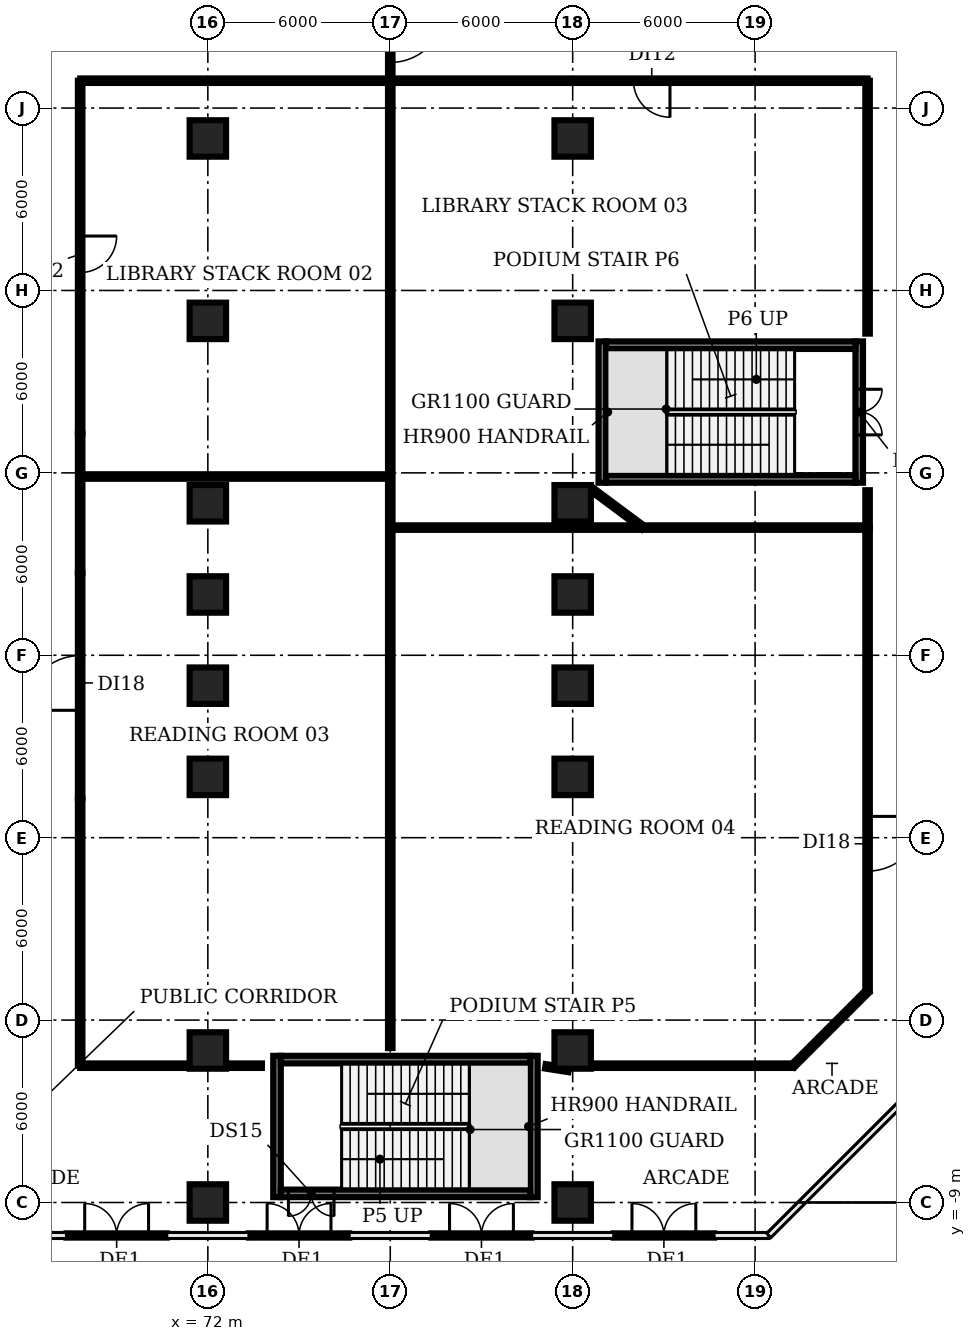
"""IFC4 building model, lengths in metres.
Left out: names, types, materials, properties, quantities, classifications, styles, units other than length and angle.
Written with IfcOpenShell. Run it as: python <this file> out.ifc"""

import sys

from ifc_helpers import new_model, si_unit, direction, frame, frame_2d, origin, origin_2d, place, context, subcontext, project, spatial, rectangle, extrude, element, fill, save


model = new_model("IFC4")
c1 = context("Model", 3, precision=1e-05, world=origin(), true_north=direction((0.0, 1.0)))
c2 = subcontext(c1, "Body", "Model", "MODEL_VIEW")
j1 = project(units=[si_unit("LENGTHUNIT", "METRE"), si_unit("PLANEANGLEUNIT", "RADIAN")], contexts=[c1])
p1 = place(None, origin())
s1 = spatial("IfcSite", under=j1, at=p1, CompositionType="ELEMENT")
p2 = place(p1, origin())
s2 = spatial("IfcBuilding", under=s1, at=p2, CompositionType="ELEMENT")
p3 = place(p2, origin())
s3 = spatial("IfcBuildingStorey", under=s2, at=p3, CompositionType="ELEMENT", Elevation=0.0)
for number, where, z_axis, x_axis in (
    (1, (72.0, -9.0, 0.0), (0.0, 0.0, 1.0), (1.0, 0.0, 0.0)),
    (2, (72.0, -4.0, 0.0), (0.0, 0.0, 1.0), (1.0, 0.0, 0.0)),
    (3, (72.0, 5.0, 0.0), (0.0, 0.0, 1.0), (1.0, 0.0, 0.0)),
    (4, (72.0, 8.0, 0.0), (0.0, 0.0, 1.0), (1.0, 0.0, 0.0)),
    (5, (72.0, 11.0, 0.0), (0.0, 0.0, 1.0), (1.0, 0.0, 0.0)),
    (6, (72.0, 14.0, 0.0), (0.0, 0.0, 1.0), (1.0, 0.0, 0.0)),
    (7, (72.0, 20.0, 0.0), (0.0, 0.0, 1.0), (1.0, 0.0, 0.0)),
    (8, (72.0, 26.0, 0.0), (0.0, 0.0, 1.0), (1.0, 0.0, 0.0)),
    (9, (84.0, -9.0, 0.0), (0.0, 0.0, 1.0), (1.0, 0.0, 0.0)),
    (10, (84.0, -4.0, 0.0), (0.0, 0.0, 1.0), (1.0, 0.0, 0.0)),
    (11, (84.0, 5.0, 0.0), (0.0, 0.0, 1.0), (1.0, 0.0, 0.0)),
    (12, (84.0, 8.0, 0.0), (0.0, 0.0, 1.0), (1.0, 0.0, 0.0)),
    (13, (84.0, 11.0, 0.0), (0.0, 0.0, 1.0), (1.0, 0.0, 0.0)),
    (14, (84.0, 14.0, 0.0), (0.0, 0.0, 1.0), (1.0, 0.0, 0.0)),
    (15, (84.0, 20.0, 0.0), (0.0, 0.0, 1.0), (1.0, 0.0, 0.0)),
    (16, (84.0, 26.0, 0.0), (0.0, 0.0, 1.0), (1.0, 0.0, 0.0)),
):
    element("IfcColumn", number, at=place(p3, frame(where, z_axis=z_axis, x_axis=x_axis)), inside=s3, PredefinedType="COLUMN", context=c2, shape_type="SweptSolid", body=[
        extrude(rectangle(XDim=1.2, YDim=1.2, at=origin_2d()), origin(), (0.0, 0.0, 1.0), 5.65),
    ])
p4 = place(p3, frame((67.35, -10.085, 0.0), z_axis=(0.0, 0.0, 1.0), x_axis=(1.0, 0.0, 0.0)))
e17 = element("IfcWall", 17, at=p4, inside=s3, PredefinedType="SOLIDWALL", context=c2, shape_type="SweptSolid", body=[
    extrude(rectangle(XDim=3.3, YDim=0.14, at=frame_2d((1.65, 0.0))), origin(), (0.0, 0.0, 1.0), 5.65),
])
p5 = place(p4, frame((0.6, 0.0, 0.0)))
e18 = element("IfcOpeningElement", 18, at=p5, cuts=e17, PredefinedType="OPENING", context=c2, shape_type="SweptSolid", body=[
    extrude(rectangle(XDim=2.1, YDim=2.4, at=frame_2d((1.05, 1.2))), frame((0.0, 0.08, 0.0), z_axis=(0.0, -1.0, 0.0), x_axis=(1.0, 0.0, 0.0)), (0.0, 0.0, 1.0), 0.16),
])
p6 = place(p3, frame((73.35, -10.085, 0.0), z_axis=(0.0, 0.0, 1.0), x_axis=(1.0, 0.0, 0.0)))
e19 = element("IfcWall", 19, at=p6, inside=s3, PredefinedType="SOLIDWALL", context=c2, shape_type="SweptSolid", body=[
    extrude(rectangle(XDim=3.3, YDim=0.14, at=frame_2d((1.65, 0.0))), origin(), (0.0, 0.0, 1.0), 5.65),
])
p7 = place(p6, frame((0.6, 0.0, 0.0)))
e20 = element("IfcOpeningElement", 20, at=p7, cuts=e19, PredefinedType="OPENING", context=c2, shape_type="SweptSolid", body=[
    extrude(rectangle(XDim=2.1, YDim=2.4, at=frame_2d((1.05, 1.2))), frame((0.0, 0.08, 0.0), z_axis=(0.0, -1.0, 0.0), x_axis=(1.0, 0.0, 0.0)), (0.0, 0.0, 1.0), 0.16),
])
p8 = place(p3, frame((79.35, -10.085, 0.0), z_axis=(0.0, 0.0, 1.0), x_axis=(1.0, 0.0, 0.0)))
e21 = element("IfcWall", 21, at=p8, inside=s3, PredefinedType="SOLIDWALL", context=c2, shape_type="SweptSolid", body=[
    extrude(rectangle(XDim=3.3, YDim=0.14, at=frame_2d((1.65, 0.0))), origin(), (0.0, 0.0, 1.0), 5.65),
])
p9 = place(p8, frame((0.6, 0.0, 0.0)))
e22 = element("IfcOpeningElement", 22, at=p9, cuts=e21, PredefinedType="OPENING", context=c2, shape_type="SweptSolid", body=[
    extrude(rectangle(XDim=2.1, YDim=2.4, at=frame_2d((1.05, 1.2))), frame((0.0, 0.08, 0.0), z_axis=(0.0, -1.0, 0.0), x_axis=(1.0, 0.0, 0.0)), (0.0, 0.0, 1.0), 0.16),
])
p10 = place(p3, frame((85.35, -10.085, 0.0), z_axis=(0.0, 0.0, 1.0), x_axis=(1.0, 0.0, 0.0)))
e23 = element("IfcWall", 23, at=p10, inside=s3, PredefinedType="SOLIDWALL", context=c2, shape_type="SweptSolid", body=[
    extrude(rectangle(XDim=3.3, YDim=0.14, at=frame_2d((1.65, 0.0))), origin(), (0.0, 0.0, 1.0), 5.65),
])
p11 = place(p10, frame((0.6, 0.0, 0.0)))
e24 = element("IfcOpeningElement", 24, at=p11, cuts=e23, PredefinedType="OPENING", context=c2, shape_type="SweptSolid", body=[
    extrude(rectangle(XDim=2.1, YDim=2.4, at=frame_2d((1.05, 1.2))), frame((0.0, 0.08, 0.0), z_axis=(0.0, -1.0, 0.0), x_axis=(1.0, 0.0, 0.0)), (0.0, 0.0, 1.0), 0.16),
])
for number, where, z_axis, x_axis in (
    (25, (74.275, -8.825, 0.0), (0.0, 0.0, 1.0), (0.0, 1.0, 0.0)),
    (26, (82.725, -8.825, 0.0), (0.0, 0.0, 1.0), (0.0, 1.0, 0.0)),
):
    element("IfcWall", number, at=place(p3, frame(where, z_axis=z_axis, x_axis=x_axis)), inside=s3, PredefinedType="SHEAR", context=c2, shape_type="SweptSolid", body=[
        extrude(rectangle(XDim=4.65, YDim=0.25, at=frame_2d((2.325, 0.0))), origin(), (0.0, 0.0, 1.0), 5.65),
    ])
p12 = place(p3, frame((82.6, -8.7, 0.0), z_axis=(0.0, 0.0, 1.0), x_axis=(-1.0, 0.0, 0.0)))
e27 = element("IfcWall", 27, at=p12, inside=s3, PredefinedType="SHEAR", context=c2, shape_type="SweptSolid", body=[
    extrude(rectangle(XDim=8.2, YDim=0.25, at=frame_2d((4.1, 0.0))), origin(), (0.0, 0.0, 1.0), 5.65),
])
p13 = place(p12, frame((6.45, 0.0, 0.0)))
e28 = element("IfcOpeningElement", 28, at=p13, cuts=e27, PredefinedType="OPENING", context=c2, shape_type="SweptSolid", body=[
    extrude(rectangle(XDim=1.5, YDim=2.1, at=frame_2d((0.75, 1.05))), frame((0.0, 0.135, 0.0), z_axis=(0.0, -1.0, 0.0), x_axis=(1.0, 0.0, 0.0)), (0.0, 0.0, 1.0), 0.27),
])
p14 = place(p3, frame((74.4, -4.3, 0.0), z_axis=(0.0, 0.0, 1.0), x_axis=(1.0, 0.0, 0.0)))
e29 = element("IfcWall", 29, at=p14, inside=s3, PredefinedType="SHEAR", context=c2, shape_type="SweptSolid", body=[
    extrude(rectangle(XDim=8.2, YDim=0.25, at=frame_2d((4.1, 0.0))), origin(), (0.0, 0.0, 1.0), 5.65),
])
p15 = place(p3, frame((84.975, 14.675, 0.0), z_axis=(0.0, 0.0, 1.0), x_axis=(0.0, 1.0, 0.0)))
e30 = element("IfcWall", 30, at=p15, inside=s3, PredefinedType="SHEAR", context=c2, shape_type="SweptSolid", body=[
    extrude(rectangle(XDim=4.65, YDim=0.25, at=frame_2d((2.325, 0.0))), origin(), (0.0, 0.0, 1.0), 5.65),
])
p16 = place(p3, frame((93.425, 19.325, 0.0), z_axis=(0.0, 0.0, 1.0), x_axis=(0.0, -1.0, 0.0)))
e31 = element("IfcWall", 31, at=p16, inside=s3, PredefinedType="SHEAR", context=c2, shape_type="SweptSolid", body=[
    extrude(rectangle(XDim=4.65, YDim=0.25, at=frame_2d((2.325, 0.0))), origin(), (0.0, 0.0, 1.0), 5.65),
])
p17 = place(p16, frame((1.575, 0.0, 0.0)))
e32 = element("IfcOpeningElement", 32, at=p17, cuts=e31, PredefinedType="OPENING", context=c2, shape_type="SweptSolid", body=[
    extrude(rectangle(XDim=1.5, YDim=2.1, at=frame_2d((0.75, 1.05))), frame((0.0, 0.135, 0.0), z_axis=(0.0, -1.0, 0.0), x_axis=(1.0, 0.0, 0.0)), (0.0, 0.0, 1.0), 0.27),
])
for number, where, z_axis, x_axis in (
    (33, (85.1, 14.8, 0.0), (0.0, 0.0, 1.0), (1.0, 0.0, 0.0)),
    (34, (85.1, 19.2, 0.0), (0.0, 0.0, 1.0), (1.0, 0.0, 0.0)),
):
    element("IfcWall", number, at=place(p3, frame(where, z_axis=z_axis, x_axis=x_axis)), inside=s3, PredefinedType="SHEAR", context=c2, shape_type="SweptSolid", body=[
        extrude(rectangle(XDim=8.2, YDim=0.25, at=frame_2d((4.1, 0.0))), origin(), (0.0, 0.0, 1.0), 5.65),
    ])
p18 = place(p3, frame((67.8, -4.5, 0.0), z_axis=(0.0, 0.0, 1.0), x_axis=(0.0, 1.0, 0.0)))
e35 = element("IfcWall", 35, at=p18, inside=s3, PredefinedType="PARTITIONING", context=c2, shape_type="SweptSolid", body=[
    extrude(rectangle(XDim=8.79, YDim=0.15, at=frame_2d((4.395, 0.0))), origin(), (0.0, 0.0, 1.0), 4.53),
])
p19 = place(p3, frame((67.8, -4.5, 0.0), z_axis=(0.0, 0.0, 1.0), x_axis=(1.0, 0.0, 0.0)))
e36 = element("IfcWall", 36, at=p19, inside=s3, PredefinedType="PARTITIONING", context=c2, shape_type="SweptSolid", body=[
    extrude(rectangle(XDim=3.74, YDim=0.15, at=frame_2d((1.87, 0.0))), origin(), (0.0, 0.0, 1.0), 4.53),
])
p20 = place(p3, frame((67.8, 4.29, 0.0), z_axis=(0.0, 0.0, 1.0), x_axis=(0.0, 1.0, 0.0)))
e37 = element("IfcWall", 37, at=p20, inside=s3, PredefinedType="PARTITIONING", context=c2, shape_type="SweptSolid", body=[
    extrude(rectangle(XDim=7.42, YDim=0.15, at=frame_2d((3.71, 0.0))), origin(), (0.0, 0.0, 1.0), 4.53),
])
p21 = place(p20, frame((2.9, 0.0, 0.0)))
e38 = element("IfcOpeningElement", 38, at=p21, cuts=e37, PredefinedType="OPENING", context=c2, shape_type="SweptSolid", body=[
    extrude(rectangle(XDim=1.8, YDim=2.1, at=frame_2d((0.9, 1.05))), frame((0.0, 0.085, 0.0), z_axis=(0.0, -1.0, 0.0), x_axis=(1.0, 0.0, 0.0)), (0.0, 0.0, 1.0), 0.17),
])
p22 = place(p3, frame((67.8, 11.71, 0.0), z_axis=(0.0, 0.0, 1.0), x_axis=(0.0, 1.0, 0.0)))
e39 = element("IfcWall", 39, at=p22, inside=s3, PredefinedType="PARTITIONING", context=c2, shape_type="SweptSolid", body=[
    extrude(rectangle(XDim=4.58, YDim=0.15, at=frame_2d((2.29, 0.0))), origin(), (0.0, 0.0, 1.0), 4.53),
])
p23 = place(p3, frame((67.8, 14.88, 0.0), z_axis=(0.0, 0.0, 1.0), x_axis=(1.0, 0.0, 0.0)))
e40 = element("IfcWall", 40, at=p23, inside=s3, PredefinedType="PARTITIONING", context=c2, shape_type="SweptSolid", body=[
    extrude(rectangle(XDim=10.2, YDim=0.15, at=frame_2d((5.1, 0.0))), origin(), (0.0, 0.0, 1.0), 4.53),
])
p24 = place(p3, frame((67.8, 27.9, 0.0), z_axis=(0.0, 0.0, 1.0), x_axis=(0.0, -1.0, 0.0)))
e41 = element("IfcWall", 41, at=p24, inside=s3, PredefinedType="PARTITIONING", context=c2, shape_type="SweptSolid", body=[
    extrude(rectangle(XDim=11.61, YDim=0.15, at=frame_2d((5.805, 0.0))), origin(), (0.0, 0.0, 1.0), 4.53),
])
p25 = place(p24, frame((5.11, 0.0, 0.0)))
e42 = element("IfcOpeningElement", 42, at=p25, cuts=e41, PredefinedType="OPENING", context=c2, shape_type="SweptSolid", body=[
    extrude(rectangle(XDim=1.2, YDim=2.1, at=frame_2d((0.6, 1.05))), frame((0.0, 0.085, 0.0), z_axis=(0.0, -1.0, 0.0), x_axis=(1.0, 0.0, 0.0)), (0.0, 0.0, 1.0), 0.17),
])
p26 = place(p3, frame((67.8, 27.9, 0.0), z_axis=(0.0, 0.0, 1.0), x_axis=(1.0, 0.0, 0.0)))
e43 = element("IfcWall", 43, at=p26, inside=s3, PredefinedType="PARTITIONING", context=c2, shape_type="SweptSolid", body=[
    extrude(rectangle(XDim=10.2, YDim=0.15, at=frame_2d((5.1, 0.0))), origin(), (0.0, 0.0, 1.0), 4.53),
])
p27 = place(p3, frame((72.46, -4.5, 0.0), z_axis=(0.0, 0.0, 1.0), x_axis=(1.0, 0.0, 0.0)))
e44 = element("IfcWall", 44, at=p27, inside=s3, PredefinedType="PARTITIONING", context=c2, shape_type="SweptSolid", body=[
    extrude(rectangle(XDim=1.32, YDim=0.15, at=frame_2d((0.66, 0.0))), origin(), (0.0, 0.0, 1.0), 4.53),
])
p28 = place(p3, frame((78.0, -3.92, 0.0), z_axis=(0.0, 0.0, 1.0), x_axis=(0.0, 1.0, 0.0)))
e45 = element("IfcWall", 45, at=p28, inside=s3, PredefinedType="PARTITIONING", context=c2, shape_type="SweptSolid", body=[
    extrude(rectangle(XDim=31.82, YDim=0.15, at=frame_2d((15.91, 0.0))), origin(), (0.0, 0.0, 1.0), 4.53),
])
p29 = place(p3, frame((78.0, 13.2, 0.0), z_axis=(0.0, 0.0, 1.0), x_axis=(1.0, 0.0, 0.0)))
e46 = element("IfcWall", 46, at=p29, inside=s3, PredefinedType="PARTITIONING", context=c2, shape_type="SweptSolid", body=[
    extrude(rectangle(XDim=15.7, YDim=0.15, at=frame_2d((7.85, 0.0))), origin(), (0.0, 0.0, 1.0), 4.53),
])
p30 = place(p3, frame((78.0, 30.9, 0.0), z_axis=(0.0, 0.0, 1.0), x_axis=(0.0, -1.0, 0.0)))
e47 = element("IfcWall", 47, at=p30, inside=s3, PredefinedType="PARTITIONING", context=c2, shape_type="SweptSolid", body=[
    extrude(rectangle(XDim=3.0, YDim=0.15, at=frame_2d((1.5, 0.0))), origin(), (0.0, 0.0, 1.0), 4.53),
])
p31 = place(p30, frame((0.6, 0.0, 0.0)))
e48 = element("IfcOpeningElement", 48, at=p31, cuts=e47, PredefinedType="OPENING", context=c2, shape_type="SweptSolid", body=[
    extrude(rectangle(XDim=1.8, YDim=2.1, at=frame_2d((0.9, 1.05))), frame((0.0, 0.085, 0.0), z_axis=(0.0, -1.0, 0.0), x_axis=(1.0, 0.0, 0.0)), (0.0, 0.0, 1.0), 0.17),
])
p32 = place(p3, frame((83.1, -4.52, 0.0), z_axis=(0.0, 0.0, 1.0), x_axis=(0.988098486873, -0.153822560892, 0.0)))
e49 = element("IfcWall", 49, at=p32, inside=s3, PredefinedType="PARTITIONING", context=c2, shape_type="SweptSolid", body=[
    extrude(rectangle(XDim=0.779, YDim=0.15, at=frame_2d((0.39, 0.0))), origin(), (0.0, 0.0, 1.0), 4.53),
])
p33 = place(p3, frame((84.46, -4.5, 0.0), z_axis=(0.0, 0.0, 1.0), x_axis=(1.0, 0.0, 0.0)))
e50 = element("IfcWall", 50, at=p33, inside=s3, PredefinedType="PARTITIONING", context=c2, shape_type="SweptSolid", body=[
    extrude(rectangle(XDim=6.79, YDim=0.15, at=frame_2d((3.395, 0.0))), origin(), (0.0, 0.0, 1.0), 4.53),
])
p34 = place(p3, frame((84.64, 14.45, 0.0), z_axis=(0.0, 0.0, 1.0), x_axis=(0.802316318144, -0.596899091673, 0.0)))
e51 = element("IfcWall", 51, at=p34, inside=s3, PredefinedType="PARTITIONING", context=c2, shape_type="SweptSolid", body=[
    extrude(rectangle(XDim=2.094, YDim=0.15, at=frame_2d((1.047, 0.0))), origin(), (0.0, 0.0, 1.0), 4.53),
])
p35 = place(p3, frame((91.25, -4.5, 0.0), z_axis=(0.0, 0.0, 1.0), x_axis=(0.707106781187, 0.707106781187, 0.0)))
e52 = element("IfcWall", 52, at=p35, inside=s3, PredefinedType="PARTITIONING", context=c2, shape_type="SweptSolid", body=[
    extrude(rectangle(XDim=3.465, YDim=0.15, at=frame_2d((1.732, 0.0))), origin(), (0.0, 0.0, 1.0), 4.53),
])
p36 = place(p3, frame((93.7, 13.2, 0.0), z_axis=(0.0, 0.0, 1.0), x_axis=(0.0, -1.0, 0.0)))
e53 = element("IfcWall", 53, at=p36, inside=s3, PredefinedType="PARTITIONING", context=c2, shape_type="SweptSolid", body=[
    extrude(rectangle(XDim=15.25, YDim=0.15, at=frame_2d((7.625, 0.0))), origin(), (0.0, 0.0, 1.0), 4.53),
])
p37 = place(p36, frame((9.5, 0.0, 0.0)))
e54 = element("IfcOpeningElement", 54, at=p37, cuts=e53, PredefinedType="OPENING", context=c2, shape_type="SweptSolid", body=[
    extrude(rectangle(XDim=1.8, YDim=2.1, at=frame_2d((0.9, 1.05))), frame((0.0, 0.085, 0.0), z_axis=(0.0, -1.0, 0.0), x_axis=(1.0, 0.0, 0.0)), (0.0, 0.0, 1.0), 0.17),
])
p38 = place(p3, frame((93.7, 13.2, 0.0), z_axis=(0.0, 0.0, 1.0), x_axis=(0.0, 1.0, 0.0)))
e55 = element("IfcWall", 55, at=p38, inside=s3, PredefinedType="PARTITIONING", context=c2, shape_type="SweptSolid", body=[
    extrude(rectangle(XDim=1.23, YDim=0.15, at=frame_2d((0.615, 0.0))), origin(), (0.0, 0.0, 1.0), 4.53),
])
p39 = place(p3, frame((93.7, 19.58, 0.0), z_axis=(0.0, 0.0, 1.0), x_axis=(0.0, 1.0, 0.0)))
e56 = element("IfcWall", 56, at=p39, inside=s3, PredefinedType="PARTITIONING", context=c2, shape_type="SweptSolid", body=[
    extrude(rectangle(XDim=8.32, YDim=0.15, at=frame_2d((4.16, 0.0))), origin(), (0.0, 0.0, 1.0), 4.53),
])
p40 = place(p3, frame((93.7, 27.9, 0.0), z_axis=(0.0, 0.0, 1.0), x_axis=(-1.0, 0.0, 0.0)))
e57 = element("IfcWall", 57, at=p40, inside=s3, PredefinedType="PARTITIONING", context=c2, shape_type="SweptSolid", body=[
    extrude(rectangle(XDim=15.7, YDim=0.15, at=frame_2d((7.85, 0.0))), origin(), (0.0, 0.0, 1.0), 4.53),
])
p41 = place(p40, frame((6.5, 0.0, 0.0)))
e58 = element("IfcOpeningElement", 58, at=p41, cuts=e57, PredefinedType="OPENING", context=c2, shape_type="SweptSolid", body=[
    extrude(rectangle(XDim=1.2, YDim=2.1, at=frame_2d((0.6, 1.05))), frame((0.0, 0.085, 0.0), z_axis=(0.0, -1.0, 0.0), x_axis=(1.0, 0.0, 0.0)), (0.0, 0.0, 1.0), 0.17),
])
p42 = place(p5, origin())
e59 = element("IfcDoor", 59, at=p42, inside=s3, OperationType="DOUBLE_DOOR_DOUBLE_SWING", PredefinedType="DOOR", context=c2, shape_type="SweptSolid", body=[
    extrude(rectangle(XDim=2.1, YDim=2.4, at=frame_2d((1.05, 1.2))), frame((0.0, 0.025, 0.0), z_axis=(0.0, -1.0, 0.0), x_axis=(1.0, 0.0, 0.0)), (0.0, 0.0, 1.0), 0.05),
])
fill(e18, e59)
p43 = place(p7, origin())
e60 = element("IfcDoor", 60, at=p43, inside=s3, OperationType="DOUBLE_DOOR_DOUBLE_SWING", PredefinedType="DOOR", context=c2, shape_type="SweptSolid", body=[
    extrude(rectangle(XDim=2.1, YDim=2.4, at=frame_2d((1.05, 1.2))), frame((0.0, 0.025, 0.0), z_axis=(0.0, -1.0, 0.0), x_axis=(1.0, 0.0, 0.0)), (0.0, 0.0, 1.0), 0.05),
])
fill(e20, e60)
p44 = place(p9, origin())
e61 = element("IfcDoor", 61, at=p44, inside=s3, OperationType="DOUBLE_DOOR_DOUBLE_SWING", PredefinedType="DOOR", context=c2, shape_type="SweptSolid", body=[
    extrude(rectangle(XDim=2.1, YDim=2.4, at=frame_2d((1.05, 1.2))), frame((0.0, 0.025, 0.0), z_axis=(0.0, -1.0, 0.0), x_axis=(1.0, 0.0, 0.0)), (0.0, 0.0, 1.0), 0.05),
])
fill(e22, e61)
p45 = place(p11, origin())
e62 = element("IfcDoor", 62, at=p45, inside=s3, OperationType="DOUBLE_DOOR_DOUBLE_SWING", PredefinedType="DOOR", context=c2, shape_type="SweptSolid", body=[
    extrude(rectangle(XDim=2.1, YDim=2.4, at=frame_2d((1.05, 1.2))), frame((0.0, 0.025, 0.0), z_axis=(0.0, -1.0, 0.0), x_axis=(1.0, 0.0, 0.0)), (0.0, 0.0, 1.0), 0.05),
])
fill(e24, e62)
p46 = place(p13, origin())
e63 = element("IfcDoor", 63, at=p46, inside=s3, OperationType="DOUBLE_DOOR_SINGLE_SWING", PredefinedType="DOOR", context=c2, shape_type="SweptSolid", body=[
    extrude(rectangle(XDim=1.5, YDim=2.1, at=frame_2d((0.75, 1.05))), frame((0.0, 0.025, 0.0), z_axis=(0.0, -1.0, 0.0), x_axis=(1.0, 0.0, 0.0)), (0.0, 0.0, 1.0), 0.05),
])
fill(e28, e63)
p47 = place(p17, origin())
e64 = element("IfcDoor", 64, at=p47, inside=s3, OperationType="DOUBLE_DOOR_SINGLE_SWING", PredefinedType="DOOR", context=c2, shape_type="SweptSolid", body=[
    extrude(rectangle(XDim=1.5, YDim=2.1, at=frame_2d((0.75, 1.05))), frame((0.0, 0.025, 0.0), z_axis=(0.0, -1.0, 0.0), x_axis=(1.0, 0.0, 0.0)), (0.0, 0.0, 1.0), 0.05),
])
fill(e32, e64)
p48 = place(p21, origin())
e65 = element("IfcDoor", 65, at=p48, inside=s3, OperationType="SINGLE_SWING_LEFT", PredefinedType="DOOR", context=c2, shape_type="SweptSolid", body=[
    extrude(rectangle(XDim=1.8, YDim=2.1, at=frame_2d((0.9, 1.05))), frame((0.0, 0.025, 0.0), z_axis=(0.0, -1.0, 0.0), x_axis=(1.0, 0.0, 0.0)), (0.0, 0.0, 1.0), 0.05),
])
fill(e38, e65)
p49 = place(p25, origin())
e66 = element("IfcDoor", 66, at=p49, inside=s3, OperationType="SINGLE_SWING_LEFT", PredefinedType="DOOR", context=c2, shape_type="SweptSolid", body=[
    extrude(rectangle(XDim=1.2, YDim=2.1, at=frame_2d((0.6, 1.05))), frame((0.0, 0.025, 0.0), z_axis=(0.0, -1.0, 0.0), x_axis=(1.0, 0.0, 0.0)), (0.0, 0.0, 1.0), 0.05),
])
fill(e42, e66)
p50 = place(p31, origin())
e67 = element("IfcDoor", 67, at=p50, inside=s3, OperationType="SINGLE_SWING_LEFT", PredefinedType="DOOR", context=c2, shape_type="SweptSolid", body=[
    extrude(rectangle(XDim=1.8, YDim=2.1, at=frame_2d((0.9, 1.05))), frame((0.0, 0.025, 0.0), z_axis=(0.0, -1.0, 0.0), x_axis=(1.0, 0.0, 0.0)), (0.0, 0.0, 1.0), 0.05),
])
fill(e48, e67)
p51 = place(p37, origin())
e68 = element("IfcDoor", 68, at=p51, inside=s3, OperationType="SINGLE_SWING_LEFT", PredefinedType="DOOR", context=c2, shape_type="SweptSolid", body=[
    extrude(rectangle(XDim=1.8, YDim=2.1, at=frame_2d((0.9, 1.05))), frame((0.0, 0.025, 0.0), z_axis=(0.0, -1.0, 0.0), x_axis=(1.0, 0.0, 0.0)), (0.0, 0.0, 1.0), 0.05),
])
fill(e54, e68)
p52 = place(p41, origin())
e69 = element("IfcDoor", 69, at=p52, inside=s3, OperationType="SINGLE_SWING_LEFT", PredefinedType="DOOR", context=c2, shape_type="SweptSolid", body=[
    extrude(rectangle(XDim=1.2, YDim=2.1, at=frame_2d((0.6, 1.05))), frame((0.0, 0.025, 0.0), z_axis=(0.0, -1.0, 0.0), x_axis=(1.0, 0.0, 0.0)), (0.0, 0.0, 1.0), 0.05),
])
fill(e58, e69)
save(model, sys.argv[1])
